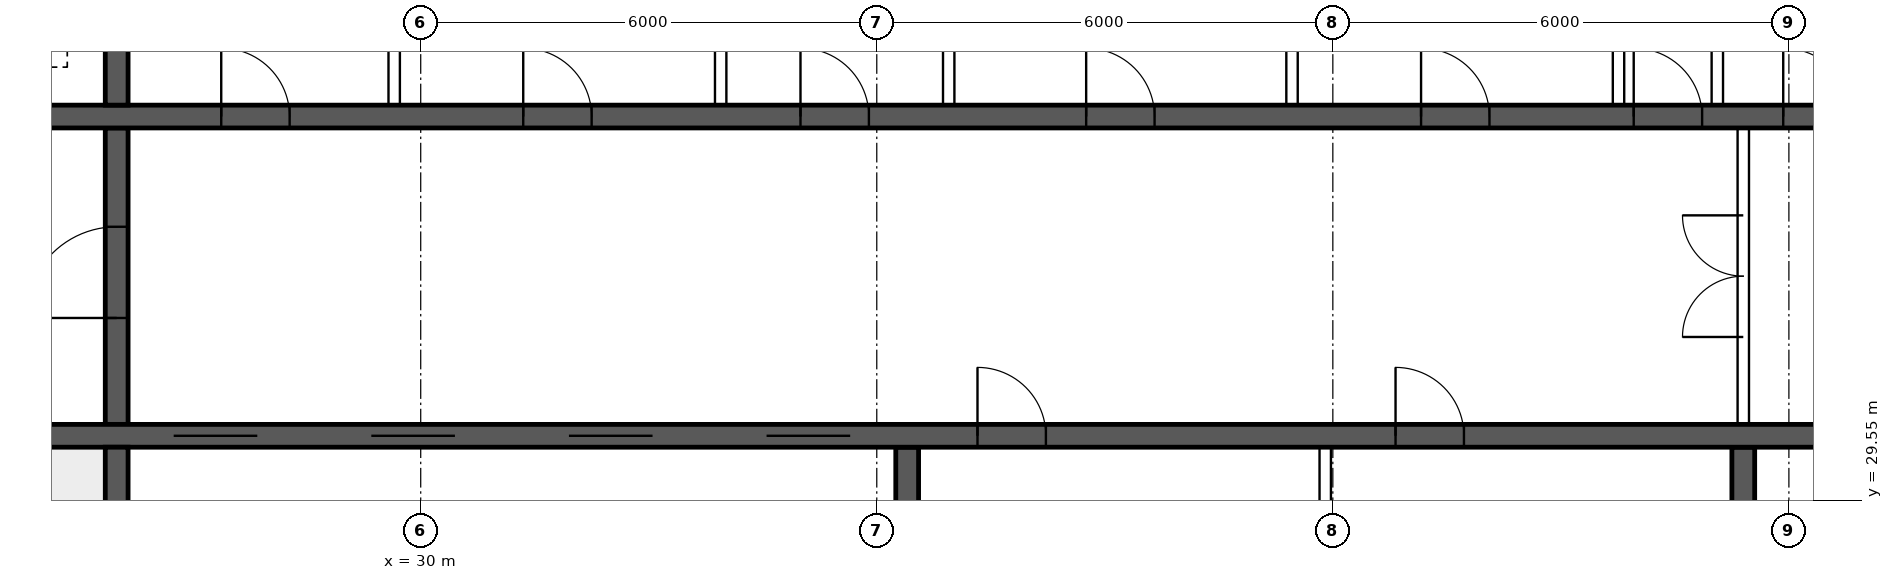
"""IFC4 building model, lengths in metres.
Left out: names, types, materials, properties, quantities, classifications, styles, units other than length and angle.
Written with IfcOpenShell. Run it as: python <this file> out.ifc"""

import sys

from ifc_helpers import new_model, si_unit, direction, frame, frame_2d, origin, place, context, subcontext, project, spatial, rectangle, extrude, element, fill, save


model = new_model("IFC4")
c1 = context("Model", 3, precision=1e-05, world=origin(), true_north=direction((0.0, 1.0)))
c2 = subcontext(c1, "Body", "Model", "MODEL_VIEW")
j1 = project(units=[si_unit("LENGTHUNIT", "METRE"), si_unit("PLANEANGLEUNIT", "RADIAN")], contexts=[c1])
p1 = place(None, origin())
s1 = spatial("IfcSite", under=j1, at=p1, CompositionType="ELEMENT")
p2 = place(p1, origin())
s2 = spatial("IfcBuilding", under=s1, at=p2, CompositionType="ELEMENT")
p3 = place(p2, frame((0.0, 0.0, 224.05)))
s3 = spatial("IfcBuildingStorey", under=s2, at=p3, CompositionType="ELEMENT", Elevation=224.05)
p4 = place(p3, frame((18.35, 30.4, 0.0), z_axis=(0.0, 0.0, 1.0), x_axis=(1.0, 0.0, 0.0)))
e1 = element("IfcWall", 1, at=p4, inside=s3, PredefinedType="SHEAR", context=c2, shape_type="SweptSolid", body=[
    extrude(rectangle(XDim=47.3, YDim=0.3, at=frame_2d((23.65, 0.0))), origin(), (0.0, 0.0, 1.0), 3.75),
])
p5 = place(p4, frame((0.4, 0.0, 0.0)))
e2 = element("IfcOpeningElement", 2, at=p5, cuts=e1, PredefinedType="OPENING", context=c2, shape_type="SweptSolid", body=[
    extrude(rectangle(XDim=1.0, YDim=2.1, at=frame_2d((0.5, 1.05))), frame((0.0, 0.16, 0.0), z_axis=(0.0, -1.0, 0.0), x_axis=(1.0, 0.0, 0.0)), (0.0, 0.0, 1.0), 0.32),
])
p6 = place(p4, frame((45.9, 0.0, 0.0)))
e3 = element("IfcOpeningElement", 3, at=p6, cuts=e1, PredefinedType="OPENING", context=c2, shape_type="SweptSolid", body=[
    extrude(rectangle(XDim=1.0, YDim=2.1, at=frame_2d((0.5, 1.05))), frame((0.0, 0.16, 0.0), z_axis=(0.0, -1.0, 0.0), x_axis=(1.0, 0.0, 0.0)), (0.0, 0.0, 1.0), 0.32),
])
p7 = place(p4, frame((8.4, 0.0, 0.0)))
e4 = element("IfcOpeningElement", 4, at=p7, cuts=e1, PredefinedType="OPENING", context=c2, shape_type="SweptSolid", body=[
    extrude(rectangle(XDim=1.1, YDim=2.1, at=frame_2d((0.55, 1.05))), frame((0.0, 0.16, 0.0), z_axis=(0.0, -1.0, 0.0), x_axis=(1.0, 0.0, 0.0)), (0.0, 0.0, 1.0), 0.32),
])
p8 = place(p4, frame((11.0, 0.0, 0.0)))
e5 = element("IfcOpeningElement", 5, at=p8, cuts=e1, PredefinedType="OPENING", context=c2, shape_type="SweptSolid", body=[
    extrude(rectangle(XDim=1.1, YDim=2.1, at=frame_2d((0.55, 1.05))), frame((0.0, 0.16, 0.0), z_axis=(0.0, -1.0, 0.0), x_axis=(1.0, 0.0, 0.0)), (0.0, 0.0, 1.0), 0.32),
])
p9 = place(p4, frame((13.6, 0.0, 0.0)))
e6 = element("IfcOpeningElement", 6, at=p9, cuts=e1, PredefinedType="OPENING", context=c2, shape_type="SweptSolid", body=[
    extrude(rectangle(XDim=1.1, YDim=2.1, at=frame_2d((0.55, 1.05))), frame((0.0, 0.16, 0.0), z_axis=(0.0, -1.0, 0.0), x_axis=(1.0, 0.0, 0.0)), (0.0, 0.0, 1.0), 0.32),
])
p10 = place(p4, frame((16.2, 0.0, 0.0)))
e7 = element("IfcOpeningElement", 7, at=p10, cuts=e1, PredefinedType="OPENING", context=c2, shape_type="SweptSolid", body=[
    extrude(rectangle(XDim=1.1, YDim=2.1, at=frame_2d((0.55, 1.05))), frame((0.0, 0.16, 0.0), z_axis=(0.0, -1.0, 0.0), x_axis=(1.0, 0.0, 0.0)), (0.0, 0.0, 1.0), 0.32),
])
p11 = place(p4, frame((18.975, 0.0, 0.0)))
e8 = element("IfcOpeningElement", 8, at=p11, cuts=e1, PredefinedType="OPENING", context=c2, shape_type="SweptSolid", body=[
    extrude(rectangle(XDim=0.9, YDim=2.1, at=frame_2d((0.45, 1.05))), frame((0.0, 0.16, 0.0), z_axis=(0.0, -1.0, 0.0), x_axis=(1.0, 0.0, 0.0)), (0.0, 0.0, 1.0), 0.32),
])
p12 = place(p4, frame((24.475, 0.0, 0.0)))
e9 = element("IfcOpeningElement", 9, at=p12, cuts=e1, PredefinedType="OPENING", context=c2, shape_type="SweptSolid", body=[
    extrude(rectangle(XDim=0.9, YDim=2.1, at=frame_2d((0.45, 1.05))), frame((0.0, 0.16, 0.0), z_axis=(0.0, -1.0, 0.0), x_axis=(1.0, 0.0, 0.0)), (0.0, 0.0, 1.0), 0.32),
])
p13 = place(p4, frame((30.267, 0.0, 0.0)))
e10 = element("IfcOpeningElement", 10, at=p13, cuts=e1, PredefinedType="OPENING", context=c2, shape_type="SweptSolid", body=[
    extrude(rectangle(XDim=1.1, YDim=2.1, at=frame_2d((0.55, 1.05))), frame((0.0, 0.16, 0.0), z_axis=(0.0, -1.0, 0.0), x_axis=(1.0, 0.0, 0.0)), (0.0, 0.0, 1.0), 0.32),
])
p14 = place(p4, frame((33.8, 0.0, 0.0)))
e11 = element("IfcOpeningElement", 11, at=p14, cuts=e1, PredefinedType="OPENING", context=c2, shape_type="SweptSolid", body=[
    extrude(rectangle(XDim=1.1, YDim=2.1, at=frame_2d((0.55, 1.05))), frame((0.0, 0.16, 0.0), z_axis=(0.0, -1.0, 0.0), x_axis=(1.0, 0.0, 0.0)), (0.0, 0.0, 1.0), 0.32),
])
p15 = place(p4, frame((37.333, 0.0, 0.0)))
e12 = element("IfcOpeningElement", 12, at=p15, cuts=e1, PredefinedType="OPENING", context=c2, shape_type="SweptSolid", body=[
    extrude(rectangle(XDim=1.1, YDim=2.1, at=frame_2d((0.55, 1.05))), frame((0.0, 0.16, 0.0), z_axis=(0.0, -1.0, 0.0), x_axis=(1.0, 0.0, 0.0)), (0.0, 0.0, 1.0), 0.32),
])
p16 = place(p3, frame((18.35, 34.6, 0.0), z_axis=(0.0, 0.0, 1.0), x_axis=(1.0, 0.0, 0.0)))
e13 = element("IfcWall", 13, at=p16, inside=s3, PredefinedType="SHEAR", context=c2, shape_type="SweptSolid", body=[
    extrude(rectangle(XDim=47.3, YDim=0.3, at=frame_2d((23.65, 0.0))), origin(), (0.0, 0.0, 1.0), 3.75),
])
p17 = place(p16, frame((0.9, 0.0, 0.0)))
e14 = element("IfcOpeningElement", 14, at=p17, cuts=e13, PredefinedType="OPENING", context=c2, shape_type="SweptSolid", body=[
    extrude(rectangle(XDim=1.1, YDim=2.1, at=frame_2d((0.55, 1.05))), frame((0.0, 0.16, 0.0), z_axis=(0.0, -1.0, 0.0), x_axis=(1.0, 0.0, 0.0)), (0.0, 0.0, 1.0), 0.32),
])
p18 = place(p16, frame((45.3, 0.0, 0.0)))
e15 = element("IfcOpeningElement", 15, at=p18, cuts=e13, PredefinedType="OPENING", context=c2, shape_type="SweptSolid", body=[
    extrude(rectangle(XDim=1.1, YDim=2.1, at=frame_2d((0.55, 1.05))), frame((0.0, 0.16, 0.0), z_axis=(0.0, -1.0, 0.0), x_axis=(1.0, 0.0, 0.0)), (0.0, 0.0, 1.0), 0.32),
])
p19 = place(p16, frame((4.25, 0.0, 0.0)))
e16 = element("IfcOpeningElement", 16, at=p19, cuts=e13, PredefinedType="OPENING", context=c2, shape_type="SweptSolid", body=[
    extrude(rectangle(XDim=0.9, YDim=2.1, at=frame_2d((0.45, 1.05))), frame((0.0, 0.16, 0.0), z_axis=(0.0, -1.0, 0.0), x_axis=(1.0, 0.0, 0.0)), (0.0, 0.0, 1.0), 0.32),
])
p20 = place(p16, frame((42.15, 0.0, 0.0)))
e17 = element("IfcOpeningElement", 17, at=p20, cuts=e13, PredefinedType="OPENING", context=c2, shape_type="SweptSolid", body=[
    extrude(rectangle(XDim=0.9, YDim=2.1, at=frame_2d((0.45, 1.05))), frame((0.0, 0.16, 0.0), z_axis=(0.0, -1.0, 0.0), x_axis=(1.0, 0.0, 0.0)), (0.0, 0.0, 1.0), 0.32),
])
p21 = place(p16, frame((9.025, 0.0, 0.0)))
e18 = element("IfcOpeningElement", 18, at=p21, cuts=e13, PredefinedType="OPENING", context=c2, shape_type="SweptSolid", body=[
    extrude(rectangle(XDim=0.9, YDim=2.1, at=frame_2d((0.45, 1.05))), frame((0.0, 0.16, 0.0), z_axis=(0.0, -1.0, 0.0), x_axis=(1.0, 0.0, 0.0)), (0.0, 0.0, 1.0), 0.32),
])
p22 = place(p16, frame((12.999, 0.0, 0.0)))
e19 = element("IfcOpeningElement", 19, at=p22, cuts=e13, PredefinedType="OPENING", context=c2, shape_type="SweptSolid", body=[
    extrude(rectangle(XDim=0.9, YDim=2.1, at=frame_2d((0.45, 1.05))), frame((0.0, 0.16, 0.0), z_axis=(0.0, -1.0, 0.0), x_axis=(1.0, 0.0, 0.0)), (0.0, 0.0, 1.0), 0.32),
])
p23 = place(p16, frame((16.646, 0.0, 0.0)))
e20 = element("IfcOpeningElement", 20, at=p23, cuts=e13, PredefinedType="OPENING", context=c2, shape_type="SweptSolid", body=[
    extrude(rectangle(XDim=0.9, YDim=2.1, at=frame_2d((0.45, 1.05))), frame((0.0, 0.16, 0.0), z_axis=(0.0, -1.0, 0.0), x_axis=(1.0, 0.0, 0.0)), (0.0, 0.0, 1.0), 0.32),
])
p24 = place(p16, frame((20.405, 0.0, 0.0)))
e21 = element("IfcOpeningElement", 21, at=p24, cuts=e13, PredefinedType="OPENING", context=c2, shape_type="SweptSolid", body=[
    extrude(rectangle(XDim=0.9, YDim=2.1, at=frame_2d((0.45, 1.05))), frame((0.0, 0.16, 0.0), z_axis=(0.0, -1.0, 0.0), x_axis=(1.0, 0.0, 0.0)), (0.0, 0.0, 1.0), 0.32),
])
p25 = place(p16, frame((24.811, 0.0, 0.0)))
e22 = element("IfcOpeningElement", 22, at=p25, cuts=e13, PredefinedType="OPENING", context=c2, shape_type="SweptSolid", body=[
    extrude(rectangle(XDim=0.9, YDim=2.1, at=frame_2d((0.45, 1.05))), frame((0.0, 0.16, 0.0), z_axis=(0.0, -1.0, 0.0), x_axis=(1.0, 0.0, 0.0)), (0.0, 0.0, 1.0), 0.32),
])
p26 = place(p16, frame((27.608, 0.0, 0.0)))
e23 = element("IfcOpeningElement", 23, at=p26, cuts=e13, PredefinedType="OPENING", context=c2, shape_type="SweptSolid", body=[
    extrude(rectangle(XDim=0.9, YDim=2.1, at=frame_2d((0.45, 1.05))), frame((0.0, 0.16, 0.0), z_axis=(0.0, -1.0, 0.0), x_axis=(1.0, 0.0, 0.0)), (0.0, 0.0, 1.0), 0.32),
])
p27 = place(p16, frame((29.575, 0.0, 0.0)))
e24 = element("IfcOpeningElement", 24, at=p27, cuts=e13, PredefinedType="OPENING", context=c2, shape_type="SweptSolid", body=[
    extrude(rectangle(XDim=0.9, YDim=2.1, at=frame_2d((0.45, 1.05))), frame((0.0, 0.16, 0.0), z_axis=(0.0, -1.0, 0.0), x_axis=(1.0, 0.0, 0.0)), (0.0, 0.0, 1.0), 0.32),
])
p28 = place(p16, frame((32.007, 0.0, 0.0)))
e25 = element("IfcOpeningElement", 25, at=p28, cuts=e13, PredefinedType="OPENING", context=c2, shape_type="SweptSolid", body=[
    extrude(rectangle(XDim=0.9, YDim=2.1, at=frame_2d((0.45, 1.05))), frame((0.0, 0.16, 0.0), z_axis=(0.0, -1.0, 0.0), x_axis=(1.0, 0.0, 0.0)), (0.0, 0.0, 1.0), 0.32),
])
p29 = place(p16, frame((34.742, 0.0, 0.0)))
e26 = element("IfcOpeningElement", 26, at=p29, cuts=e13, PredefinedType="OPENING", context=c2, shape_type="SweptSolid", body=[
    extrude(rectangle(XDim=0.9, YDim=2.1, at=frame_2d((0.45, 1.05))), frame((0.0, 0.16, 0.0), z_axis=(0.0, -1.0, 0.0), x_axis=(1.0, 0.0, 0.0)), (0.0, 0.0, 1.0), 0.32),
])
p30 = place(p16, frame((37.781, 0.0, 0.0)))
e27 = element("IfcOpeningElement", 27, at=p30, cuts=e13, PredefinedType="OPENING", context=c2, shape_type="SweptSolid", body=[
    extrude(rectangle(XDim=0.9, YDim=2.1, at=frame_2d((0.45, 1.05))), frame((0.0, 0.16, 0.0), z_axis=(0.0, -1.0, 0.0), x_axis=(1.0, 0.0, 0.0)), (0.0, 0.0, 1.0), 0.32),
])
p31 = place(p3, frame((26.0, 26.15, 0.0), z_axis=(0.0, 0.0, 1.0), x_axis=(0.0, 1.0, 0.0)))
e28 = element("IfcWall", 28, at=p31, inside=s3, PredefinedType="SHEAR", context=c2, shape_type="SweptSolid", body=[
    extrude(rectangle(XDim=4.1, YDim=0.3, at=frame_2d((2.05, 0.0))), origin(), (0.0, 0.0, 1.0), 3.75),
])
p32 = place(p3, frame((26.0, 30.55, 0.0), z_axis=(0.0, 0.0, 1.0), x_axis=(0.0, 1.0, 0.0)))
e29 = element("IfcWall", 29, at=p32, inside=s3, PredefinedType="SHEAR", context=c2, shape_type="SweptSolid", body=[
    extrude(rectangle(XDim=3.9, YDim=0.3, at=frame_2d((1.95, 0.0))), origin(), (0.0, 0.0, 1.0), 3.75),
])
p33 = place(p32, frame((1.4, 0.0, 0.0)))
e30 = element("IfcOpeningElement", 30, at=p33, cuts=e29, PredefinedType="OPENING", context=c2, shape_type="SweptSolid", body=[
    extrude(rectangle(XDim=1.2, YDim=2.1, at=frame_2d((0.6, 1.05))), frame((0.0, 0.16, 0.0), z_axis=(0.0, -1.0, 0.0), x_axis=(1.0, 0.0, 0.0)), (0.0, 0.0, 1.0), 0.32),
])
p34 = place(p3, frame((26.0, 34.75, 0.0), z_axis=(0.0, 0.0, 1.0), x_axis=(0.0, 1.0, 0.0)))
e31 = element("IfcWall", 31, at=p34, inside=s3, PredefinedType="SHEAR", context=c2, shape_type="SweptSolid", body=[
    extrude(rectangle(XDim=3.1, YDim=0.3, at=frame_2d((1.55, 0.0))), origin(), (0.0, 0.0, 1.0), 3.75),
])
for number, where, z_axis, x_axis in (
    (32, (36.4, 26.15, 0.0), (0.0, 0.0, 1.0), (0.0, 1.0, 0.0)),
    (33, (47.4, 26.15, 0.0), (0.0, 0.0, 1.0), (0.0, 1.0, 0.0)),
):
    element("IfcWall", number, at=place(p3, frame(where, z_axis=z_axis, x_axis=x_axis)), inside=s3, PredefinedType="SHEAR", context=c2, shape_type="SweptSolid", body=[
        extrude(rectangle(XDim=4.1, YDim=0.3, at=frame_2d((2.05, 0.0))), origin(), (0.0, 0.0, 1.0), 3.75),
    ])
p35 = place(p3, frame((47.4, 30.55, 0.0), z_axis=(0.0, 0.0, 1.0), x_axis=(0.0, 1.0, 0.0)))
e34 = element("IfcWall", 34, at=p35, inside=s3, PredefinedType="SOLIDWALL", context=c2, shape_type="SweptSolid", body=[
    extrude(rectangle(XDim=3.9, YDim=0.15, at=frame_2d((1.95, 0.0))), origin(), (0.0, 0.0, 1.0), 3.5),
])
p36 = place(p35, frame((1.15, 0.0, 0.0)))
e35 = element("IfcOpeningElement", 35, at=p36, cuts=e34, PredefinedType="OPENING", context=c2, shape_type="SweptSolid", body=[
    extrude(rectangle(XDim=1.6, YDim=2.1, at=frame_2d((0.8, 1.05))), frame((0.0, 0.085, 0.0), z_axis=(0.0, -1.0, 0.0), x_axis=(1.0, 0.0, 0.0)), (0.0, 0.0, 1.0), 0.17),
])
for number, where, z_axis, x_axis in (
    (36, (29.651, 34.75, 0.0), (0.0, 0.0, 1.0), (0.0, 1.0, 0.0)),
    (37, (33.946, 34.75, 0.0), (0.0, 0.0, 1.0), (0.0, 1.0, 0.0)),
    (38, (36.946, 34.75, 0.0), (0.0, 0.0, 1.0), (0.0, 1.0, 0.0)),
    (39, (41.463, 34.75, 0.0), (0.0, 0.0, 1.0), (0.0, 1.0, 0.0)),
    (40, (45.758, 34.75, 0.0), (0.0, 0.0, 1.0), (0.0, 1.0, 0.0)),
    (41, (47.058, 34.75, 0.0), (0.0, 0.0, 1.0), (0.0, 1.0, 0.0)),
):
    element("IfcWall", number, at=place(p3, frame(where, z_axis=z_axis, x_axis=x_axis)), inside=s3, PredefinedType="SOLIDWALL", context=c2, shape_type="SweptSolid", body=[
        extrude(rectangle(XDim=3.1, YDim=0.15, at=frame_2d((1.55, 0.0))), origin(), (0.0, 0.0, 1.0), 3.5),
    ])
p37 = place(p3, frame((41.9, 26.15, 0.0), z_axis=(0.0, 0.0, 1.0), x_axis=(0.0, 1.0, 0.0)))
e42 = element("IfcWall", 42, at=p37, inside=s3, PredefinedType="SOLIDWALL", context=c2, shape_type="SweptSolid", body=[
    extrude(rectangle(XDim=4.1, YDim=0.15, at=frame_2d((2.05, 0.0))), origin(), (0.0, 0.0, 1.0), 3.5),
])
p38 = place(p36, origin())
e43 = element("IfcDoor", 43, at=p38, inside=s3, OperationType="DOUBLE_DOOR_SINGLE_SWING", PredefinedType="DOOR", context=c2, shape_type="SweptSolid", body=[
    extrude(rectangle(XDim=1.6, YDim=2.1, at=frame_2d((0.8, 1.05))), frame((0.0, 0.025, 0.0), z_axis=(0.0, -1.0, 0.0), x_axis=(1.0, 0.0, 0.0)), (0.0, 0.0, 1.0), 0.05),
])
fill(e35, e43)
p39 = place(p33, origin())
e44 = element("IfcDoor", 44, at=p39, inside=s3, OperationType="SINGLE_SWING_LEFT", PredefinedType="DOOR", context=c2, shape_type="SweptSolid", body=[
    extrude(rectangle(XDim=1.2, YDim=2.1, at=frame_2d((0.6, 1.05))), frame((0.0, 0.025, 0.0), z_axis=(0.0, -1.0, 0.0), x_axis=(1.0, 0.0, 0.0)), (0.0, 0.0, 1.0), 0.05),
])
fill(e30, e44)
p40 = place(p21, origin())
e45 = element("IfcDoor", 45, at=p40, inside=s3, OperationType="SINGLE_SWING_LEFT", PredefinedType="DOOR", context=c2, shape_type="SweptSolid", body=[
    extrude(rectangle(XDim=0.9, YDim=2.1, at=frame_2d((0.45, 1.05))), frame((0.0, 0.025, 0.0), z_axis=(0.0, -1.0, 0.0), x_axis=(1.0, 0.0, 0.0)), (0.0, 0.0, 1.0), 0.05),
])
fill(e18, e45)
p41 = place(p22, origin())
e46 = element("IfcDoor", 46, at=p41, inside=s3, OperationType="SINGLE_SWING_LEFT", PredefinedType="DOOR", context=c2, shape_type="SweptSolid", body=[
    extrude(rectangle(XDim=0.9, YDim=2.1, at=frame_2d((0.45, 1.05))), frame((0.0, 0.025, 0.0), z_axis=(0.0, -1.0, 0.0), x_axis=(1.0, 0.0, 0.0)), (0.0, 0.0, 1.0), 0.05),
])
fill(e19, e46)
p42 = place(p23, origin())
e47 = element("IfcDoor", 47, at=p42, inside=s3, OperationType="SINGLE_SWING_LEFT", PredefinedType="DOOR", context=c2, shape_type="SweptSolid", body=[
    extrude(rectangle(XDim=0.9, YDim=2.1, at=frame_2d((0.45, 1.05))), frame((0.0, 0.025, 0.0), z_axis=(0.0, -1.0, 0.0), x_axis=(1.0, 0.0, 0.0)), (0.0, 0.0, 1.0), 0.05),
])
fill(e20, e47)
p43 = place(p24, origin())
e48 = element("IfcDoor", 48, at=p43, inside=s3, OperationType="SINGLE_SWING_LEFT", PredefinedType="DOOR", context=c2, shape_type="SweptSolid", body=[
    extrude(rectangle(XDim=0.9, YDim=2.1, at=frame_2d((0.45, 1.05))), frame((0.0, 0.025, 0.0), z_axis=(0.0, -1.0, 0.0), x_axis=(1.0, 0.0, 0.0)), (0.0, 0.0, 1.0), 0.05),
])
fill(e21, e48)
p44 = place(p25, origin())
e49 = element("IfcDoor", 49, at=p44, inside=s3, OperationType="SINGLE_SWING_LEFT", PredefinedType="DOOR", context=c2, shape_type="SweptSolid", body=[
    extrude(rectangle(XDim=0.9, YDim=2.1, at=frame_2d((0.45, 1.05))), frame((0.0, 0.025, 0.0), z_axis=(0.0, -1.0, 0.0), x_axis=(1.0, 0.0, 0.0)), (0.0, 0.0, 1.0), 0.05),
])
fill(e22, e49)
p45 = place(p26, origin())
e50 = element("IfcDoor", 50, at=p45, inside=s3, OperationType="SINGLE_SWING_LEFT", PredefinedType="DOOR", context=c2, shape_type="SweptSolid", body=[
    extrude(rectangle(XDim=0.9, YDim=2.1, at=frame_2d((0.45, 1.05))), frame((0.0, 0.025, 0.0), z_axis=(0.0, -1.0, 0.0), x_axis=(1.0, 0.0, 0.0)), (0.0, 0.0, 1.0), 0.05),
])
fill(e23, e50)
p46 = place(p27, origin())
e51 = element("IfcDoor", 51, at=p46, inside=s3, OperationType="SINGLE_SWING_LEFT", PredefinedType="DOOR", context=c2, shape_type="SweptSolid", body=[
    extrude(rectangle(XDim=0.9, YDim=2.1, at=frame_2d((0.45, 1.05))), frame((0.0, 0.025, 0.0), z_axis=(0.0, -1.0, 0.0), x_axis=(1.0, 0.0, 0.0)), (0.0, 0.0, 1.0), 0.05),
])
fill(e24, e51)
p47 = place(p7, origin())
e52 = element("IfcDoor", 52, at=p47, inside=s3, OperationType="DOUBLE_DOOR_SLIDING", PredefinedType="DOOR", context=c2, shape_type="SweptSolid", body=[
    extrude(rectangle(XDim=1.1, YDim=2.1, at=frame_2d((0.55, 1.05))), frame((0.0, 0.025, 0.0), z_axis=(0.0, -1.0, 0.0), x_axis=(1.0, 0.0, 0.0)), (0.0, 0.0, 1.0), 0.05),
])
fill(e4, e52)
p48 = place(p8, origin())
e53 = element("IfcDoor", 53, at=p48, inside=s3, OperationType="DOUBLE_DOOR_SLIDING", PredefinedType="DOOR", context=c2, shape_type="SweptSolid", body=[
    extrude(rectangle(XDim=1.1, YDim=2.1, at=frame_2d((0.55, 1.05))), frame((0.0, 0.025, 0.0), z_axis=(0.0, -1.0, 0.0), x_axis=(1.0, 0.0, 0.0)), (0.0, 0.0, 1.0), 0.05),
])
fill(e5, e53)
p49 = place(p9, origin())
e54 = element("IfcDoor", 54, at=p49, inside=s3, OperationType="DOUBLE_DOOR_SLIDING", PredefinedType="DOOR", context=c2, shape_type="SweptSolid", body=[
    extrude(rectangle(XDim=1.1, YDim=2.1, at=frame_2d((0.55, 1.05))), frame((0.0, 0.025, 0.0), z_axis=(0.0, -1.0, 0.0), x_axis=(1.0, 0.0, 0.0)), (0.0, 0.0, 1.0), 0.05),
])
fill(e6, e54)
p50 = place(p10, origin())
e55 = element("IfcDoor", 55, at=p50, inside=s3, OperationType="DOUBLE_DOOR_SLIDING", PredefinedType="DOOR", context=c2, shape_type="SweptSolid", body=[
    extrude(rectangle(XDim=1.1, YDim=2.1, at=frame_2d((0.55, 1.05))), frame((0.0, 0.025, 0.0), z_axis=(0.0, -1.0, 0.0), x_axis=(1.0, 0.0, 0.0)), (0.0, 0.0, 1.0), 0.05),
])
fill(e7, e55)
p51 = place(p11, origin())
e56 = element("IfcDoor", 56, at=p51, inside=s3, OperationType="SINGLE_SWING_LEFT", PredefinedType="DOOR", context=c2, shape_type="SweptSolid", body=[
    extrude(rectangle(XDim=0.9, YDim=2.1, at=frame_2d((0.45, 1.05))), frame((0.0, 0.025, 0.0), z_axis=(0.0, -1.0, 0.0), x_axis=(1.0, 0.0, 0.0)), (0.0, 0.0, 1.0), 0.05),
])
fill(e8, e56)
p52 = place(p12, origin())
e57 = element("IfcDoor", 57, at=p52, inside=s3, OperationType="SINGLE_SWING_LEFT", PredefinedType="DOOR", context=c2, shape_type="SweptSolid", body=[
    extrude(rectangle(XDim=0.9, YDim=2.1, at=frame_2d((0.45, 1.05))), frame((0.0, 0.025, 0.0), z_axis=(0.0, -1.0, 0.0), x_axis=(1.0, 0.0, 0.0)), (0.0, 0.0, 1.0), 0.05),
])
fill(e9, e57)
save(model, sys.argv[1])
